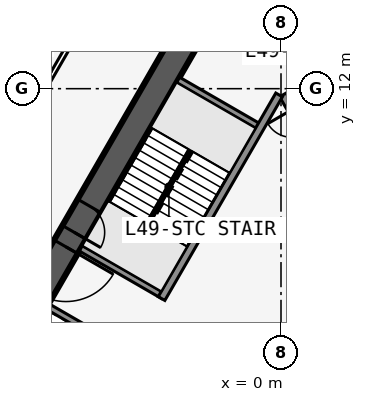
"""IFC4 building model, lengths in metres.
Left out: names, types, materials, properties, quantities, classifications, styles, units other than length and angle.
Written with IfcOpenShell. Run it as: python <this file> out.ifc"""

import sys

from ifc_helpers import new_model, si_unit, direction, frame, frame_2d, origin, place, context, subcontext, project, spatial, rectangle, extrude, element, fill, save


model = new_model("IFC4")
c1 = context("Model", 3, precision=1e-05, world=origin(), true_north=direction((0.0, 1.0)))
c2 = subcontext(c1, "Body", "Model", "MODEL_VIEW")
j1 = project(units=[si_unit("LENGTHUNIT", "METRE"), si_unit("PLANEANGLEUNIT", "RADIAN")], contexts=[c1])
p1 = place(None, origin())
s1 = spatial("IfcSite", under=j1, at=p1, CompositionType="ELEMENT")
p2 = place(p1, origin())
s2 = spatial("IfcBuilding", under=s1, at=p2, CompositionType="ELEMENT")
p3 = place(p2, frame((0.0, 0.0, 182.7)))
s3 = spatial("IfcBuildingStorey", under=s2, at=p3, CompositionType="ELEMENT", Elevation=182.7)
p4 = place(p3, frame((16.5, -9.526, 0.0), z_axis=(0.0, 0.0, 1.0), x_axis=(-0.499999749417, 0.866025548458, 0.0)))
e1 = element("IfcWall", 1, at=p4, inside=s3, PredefinedType="SHEAR", context=c2, shape_type="SweptSolid", body=[
    extrude(rectangle(XDim=33.0, YDim=0.9, at=frame_2d((16.5, 0.0))), origin(), (0.0, 0.0, 1.0), 3.4),
])
p5 = place(p4, frame((14.15, 0.0, 0.0)))
e2 = element("IfcOpeningElement", 2, at=p5, cuts=e1, PredefinedType="OPENING", context=c2, shape_type="SweptSolid", body=[
    extrude(rectangle(XDim=1.8, YDim=2.13, at=frame_2d((0.9, 1.065))), frame((0.0, 0.46, 0.0), z_axis=(0.0, -1.0, 0.0), x_axis=(1.0, 0.0, 0.0)), (0.0, 0.0, 1.0), 0.92),
])
p6 = place(p4, frame((12.6, 0.0, 0.0)))
e3 = element("IfcOpeningElement", 3, at=p6, cuts=e1, PredefinedType="OPENING", context=c2, shape_type="SweptSolid", body=[
    extrude(rectangle(XDim=1.0, YDim=2.13, at=frame_2d((0.5, 1.065))), frame((0.0, 0.46, 0.0), z_axis=(0.0, -1.0, 0.0), x_axis=(1.0, 0.0, 0.0)), (0.0, 0.0, 1.0), 0.92),
])
p7 = place(p3, frame((5.379, 2.586, 0.0), z_axis=(0.0, 0.0, 1.0), x_axis=(-0.500001375892, 0.866024609411, 0.0)))
e4 = element("IfcWall", 4, at=p7, inside=s3, PredefinedType="SOLIDWALL", context=c2, shape_type="SweptSolid", body=[
    extrude(rectangle(XDim=10.633, YDim=0.25, at=frame_2d((5.316, 0.0))), origin(), (0.0, 0.0, 1.0), 3.235),
])
p8 = place(p7, frame((9.164, 0.0, 0.0)))
e5 = element("IfcOpeningElement", 5, at=p8, cuts=e4, PredefinedType="OPENING", context=c2, shape_type="SweptSolid", body=[
    extrude(rectangle(XDim=0.9, YDim=2.13, at=frame_2d((0.45, 1.065))), frame((0.0, 0.135, 0.0), z_axis=(0.0, -1.0, 0.0), x_axis=(1.0, 0.0, 0.0)), (0.0, 0.0, 1.0), 0.27),
])
p9 = place(p7, frame((1.0, 0.0, 0.0)))
e6 = element("IfcOpeningElement", 6, at=p9, cuts=e4, PredefinedType="OPENING", context=c2, shape_type="SweptSolid", body=[
    extrude(rectangle(XDim=1.1, YDim=2.13, at=frame_2d((0.55, 1.065))), frame((0.0, 0.135, 0.0), z_axis=(0.0, -1.0, 0.0), x_axis=(1.0, 0.0, 0.0)), (0.0, 0.0, 1.0), 0.27),
])
p10 = place(p7, frame((3.9, 0.0, 0.0)))
e7 = element("IfcOpeningElement", 7, at=p10, cuts=e4, PredefinedType="OPENING", context=c2, shape_type="SweptSolid", body=[
    extrude(rectangle(XDim=1.1, YDim=2.13, at=frame_2d((0.55, 1.065))), frame((0.0, 0.135, 0.0), z_axis=(0.0, -1.0, 0.0), x_axis=(1.0, 0.0, 0.0)), (0.0, 0.0, 1.0), 0.27),
])
p11 = place(p7, frame((6.8, 0.0, 0.0)))
e8 = element("IfcOpeningElement", 8, at=p11, cuts=e4, PredefinedType="OPENING", context=c2, shape_type="SweptSolid", body=[
    extrude(rectangle(XDim=1.1, YDim=2.13, at=frame_2d((0.55, 1.065))), frame((0.0, 0.135, 0.0), z_axis=(0.0, -1.0, 0.0), x_axis=(1.0, 0.0, 0.0)), (0.0, 0.0, 1.0), 0.27),
])
p12 = place(p3, frame((0.0, 19.052, 0.0), z_axis=(0.0, 0.0, 1.0), x_axis=(-0.499999749417, -0.866025548458, 0.0)))
e9 = element("IfcWall", 9, at=p12, inside=s3, PredefinedType="SHEAR", context=c2, shape_type="SweptSolid", body=[
    extrude(rectangle(XDim=33.0, YDim=0.9, at=frame_2d((16.5, 0.0))), origin(), (0.0, 0.0, 1.0), 3.4),
])
p13 = place(p12, frame((14.15, 0.0, 0.0)))
e10 = element("IfcOpeningElement", 10, at=p13, cuts=e9, PredefinedType="OPENING", context=c2, shape_type="SweptSolid", body=[
    extrude(rectangle(XDim=1.8, YDim=2.13, at=frame_2d((0.9, 1.065))), frame((0.0, 0.46, 0.0), z_axis=(0.0, -1.0, 0.0), x_axis=(1.0, 0.0, 0.0)), (0.0, 0.0, 1.0), 0.92),
])
p14 = place(p12, frame((12.6, 0.0, 0.0)))
e11 = element("IfcOpeningElement", 11, at=p14, cuts=e9, PredefinedType="OPENING", context=c2, shape_type="SweptSolid", body=[
    extrude(rectangle(XDim=1.0, YDim=2.13, at=frame_2d((0.5, 1.065))), frame((0.0, 0.46, 0.0), z_axis=(0.0, -1.0, 0.0), x_axis=(1.0, 0.0, 0.0)), (0.0, 0.0, 1.0), 0.92),
])
p15 = place(p3, frame((-0.062, 11.794, 0.0), z_axis=(0.0, 0.0, 1.0), x_axis=(-0.500006680225, -0.86602154692, 0.0)))
e12 = element("IfcWall", 12, at=p15, inside=s3, PredefinedType="SOLIDWALL", context=c2, shape_type="SweptSolid", body=[
    extrude(rectangle(XDim=7.733, YDim=0.25, at=frame_2d((3.866, 0.0))), origin(), (0.0, 0.0, 1.0), 3.235),
])
for number, where, z_axis, x_axis in (
    (13, (-0.679, 10.727, 0.0), (0.0, 0.0, 1.0), (-0.866, 0.5, 0.0)),
    (14, (-3.879, 5.184, 0.0), (0.0, 0.0, 1.0), (-0.866, 0.5, 0.0)),
    (15, (-4.979, 3.279, 0.0), (0.0, 0.0, 1.0), (-0.866, 0.5, 0.0)),
):
    element("IfcWall", number, at=place(p3, frame(where, z_axis=z_axis, x_axis=x_axis)), inside=s3, PredefinedType="SOLIDWALL", context=c2, shape_type="SweptSolid", body=[
        extrude(rectangle(XDim=3.125, YDim=0.2, at=frame_2d((1.562, 0.0))), origin(), (0.0, 0.0, 1.0), 3.235),
    ])
p16 = place(p3, frame((-0.5, 24.636, 0.0), z_axis=(0.0, 0.0, 1.0), x_axis=(-0.500001915564, -0.86602429783, 0.0)))
e16 = element("IfcWall", 16, at=p16, inside=s3, PredefinedType="PARTITIONING", context=c2, shape_type="SweptSolid", body=[
    extrude(rectangle(XDim=42.172, YDim=0.15, at=frame_2d((21.086, 0.0))), origin(), (0.0, 0.0, 1.0), 3.235),
])
p17 = place(p16, frame((2.338, 0.0, 0.0)))
e17 = element("IfcOpeningElement", 17, at=p17, cuts=e16, PredefinedType="OPENING", context=c2, shape_type="SweptSolid", body=[
    extrude(rectangle(XDim=0.95, YDim=2.13, at=frame_2d((0.475, 1.065))), frame((0.0, 0.085, 0.0), z_axis=(0.0, -1.0, 0.0), x_axis=(1.0, 0.0, 0.0)), (0.0, 0.0, 1.0), 0.17),
])
p18 = place(p16, frame((18.111, 0.0, 0.0)))
e18 = element("IfcOpeningElement", 18, at=p18, cuts=e16, PredefinedType="OPENING", context=c2, shape_type="SweptSolid", body=[
    extrude(rectangle(XDim=0.95, YDim=2.13, at=frame_2d((0.475, 1.065))), frame((0.0, 0.085, 0.0), z_axis=(0.0, -1.0, 0.0), x_axis=(1.0, 0.0, 0.0)), (0.0, 0.0, 1.0), 0.17),
])
p19 = place(p16, frame((28.111, 0.0, 0.0)))
e19 = element("IfcOpeningElement", 19, at=p19, cuts=e16, PredefinedType="OPENING", context=c2, shape_type="SweptSolid", body=[
    extrude(rectangle(XDim=0.95, YDim=2.13, at=frame_2d((0.475, 1.065))), frame((0.0, 0.085, 0.0), z_axis=(0.0, -1.0, 0.0), x_axis=(1.0, 0.0, 0.0)), (0.0, 0.0, 1.0), 0.17),
])
p20 = place(p16, frame((39.311, 0.0, 0.0)))
e20 = element("IfcOpeningElement", 20, at=p20, cuts=e16, PredefinedType="OPENING", context=c2, shape_type="SweptSolid", body=[
    extrude(rectangle(XDim=0.95, YDim=2.13, at=frame_2d((0.475, 1.065))), frame((0.0, 0.085, 0.0), z_axis=(0.0, -1.0, 0.0), x_axis=(1.0, 0.0, 0.0)), (0.0, 0.0, 1.0), 0.17),
])
p21 = place(p3, frame((-2.988, 9.978, 0.0), z_axis=(0.0, 0.0, 1.0), x_axis=(-0.499992232847, -0.866029888106, 0.0)))
e21 = element("IfcWall", 21, at=p21, inside=s3, PredefinedType="SOLIDWALL", context=c2, shape_type="SweptSolid", body=[
    extrude(rectangle(XDim=2.794, YDim=0.1, at=frame_2d((1.397, 0.0))), origin(), (0.0, 0.0, 1.0), 3.4),
])
p22 = place(p13, origin())
e22 = element("IfcDoor", 22, at=p22, inside=s3, OperationType="DOUBLE_DOOR_SINGLE_SWING", PredefinedType="DOOR", context=c2, shape_type="SweptSolid", body=[
    extrude(rectangle(XDim=1.8, YDim=2.13, at=frame_2d((0.9, 1.065))), frame((0.0, 0.025, 0.0), z_axis=(0.0, -1.0, 0.0), x_axis=(1.0, 0.0, 0.0)), (0.0, 0.0, 1.0), 0.05),
])
fill(e10, e22)
p23 = place(p14, origin())
e23 = element("IfcDoor", 23, at=p23, inside=s3, OperationType="SINGLE_SWING_RIGHT", PredefinedType="DOOR", context=c2, shape_type="SweptSolid", body=[
    extrude(rectangle(XDim=1.0, YDim=2.13, at=frame_2d((0.5, 1.065))), frame((0.0, 0.025, 0.0), z_axis=(0.0, -1.0, 0.0), x_axis=(1.0, 0.0, 0.0)), (0.0, 0.0, 1.0), 0.05),
])
fill(e11, e23)
save(model, sys.argv[1])
